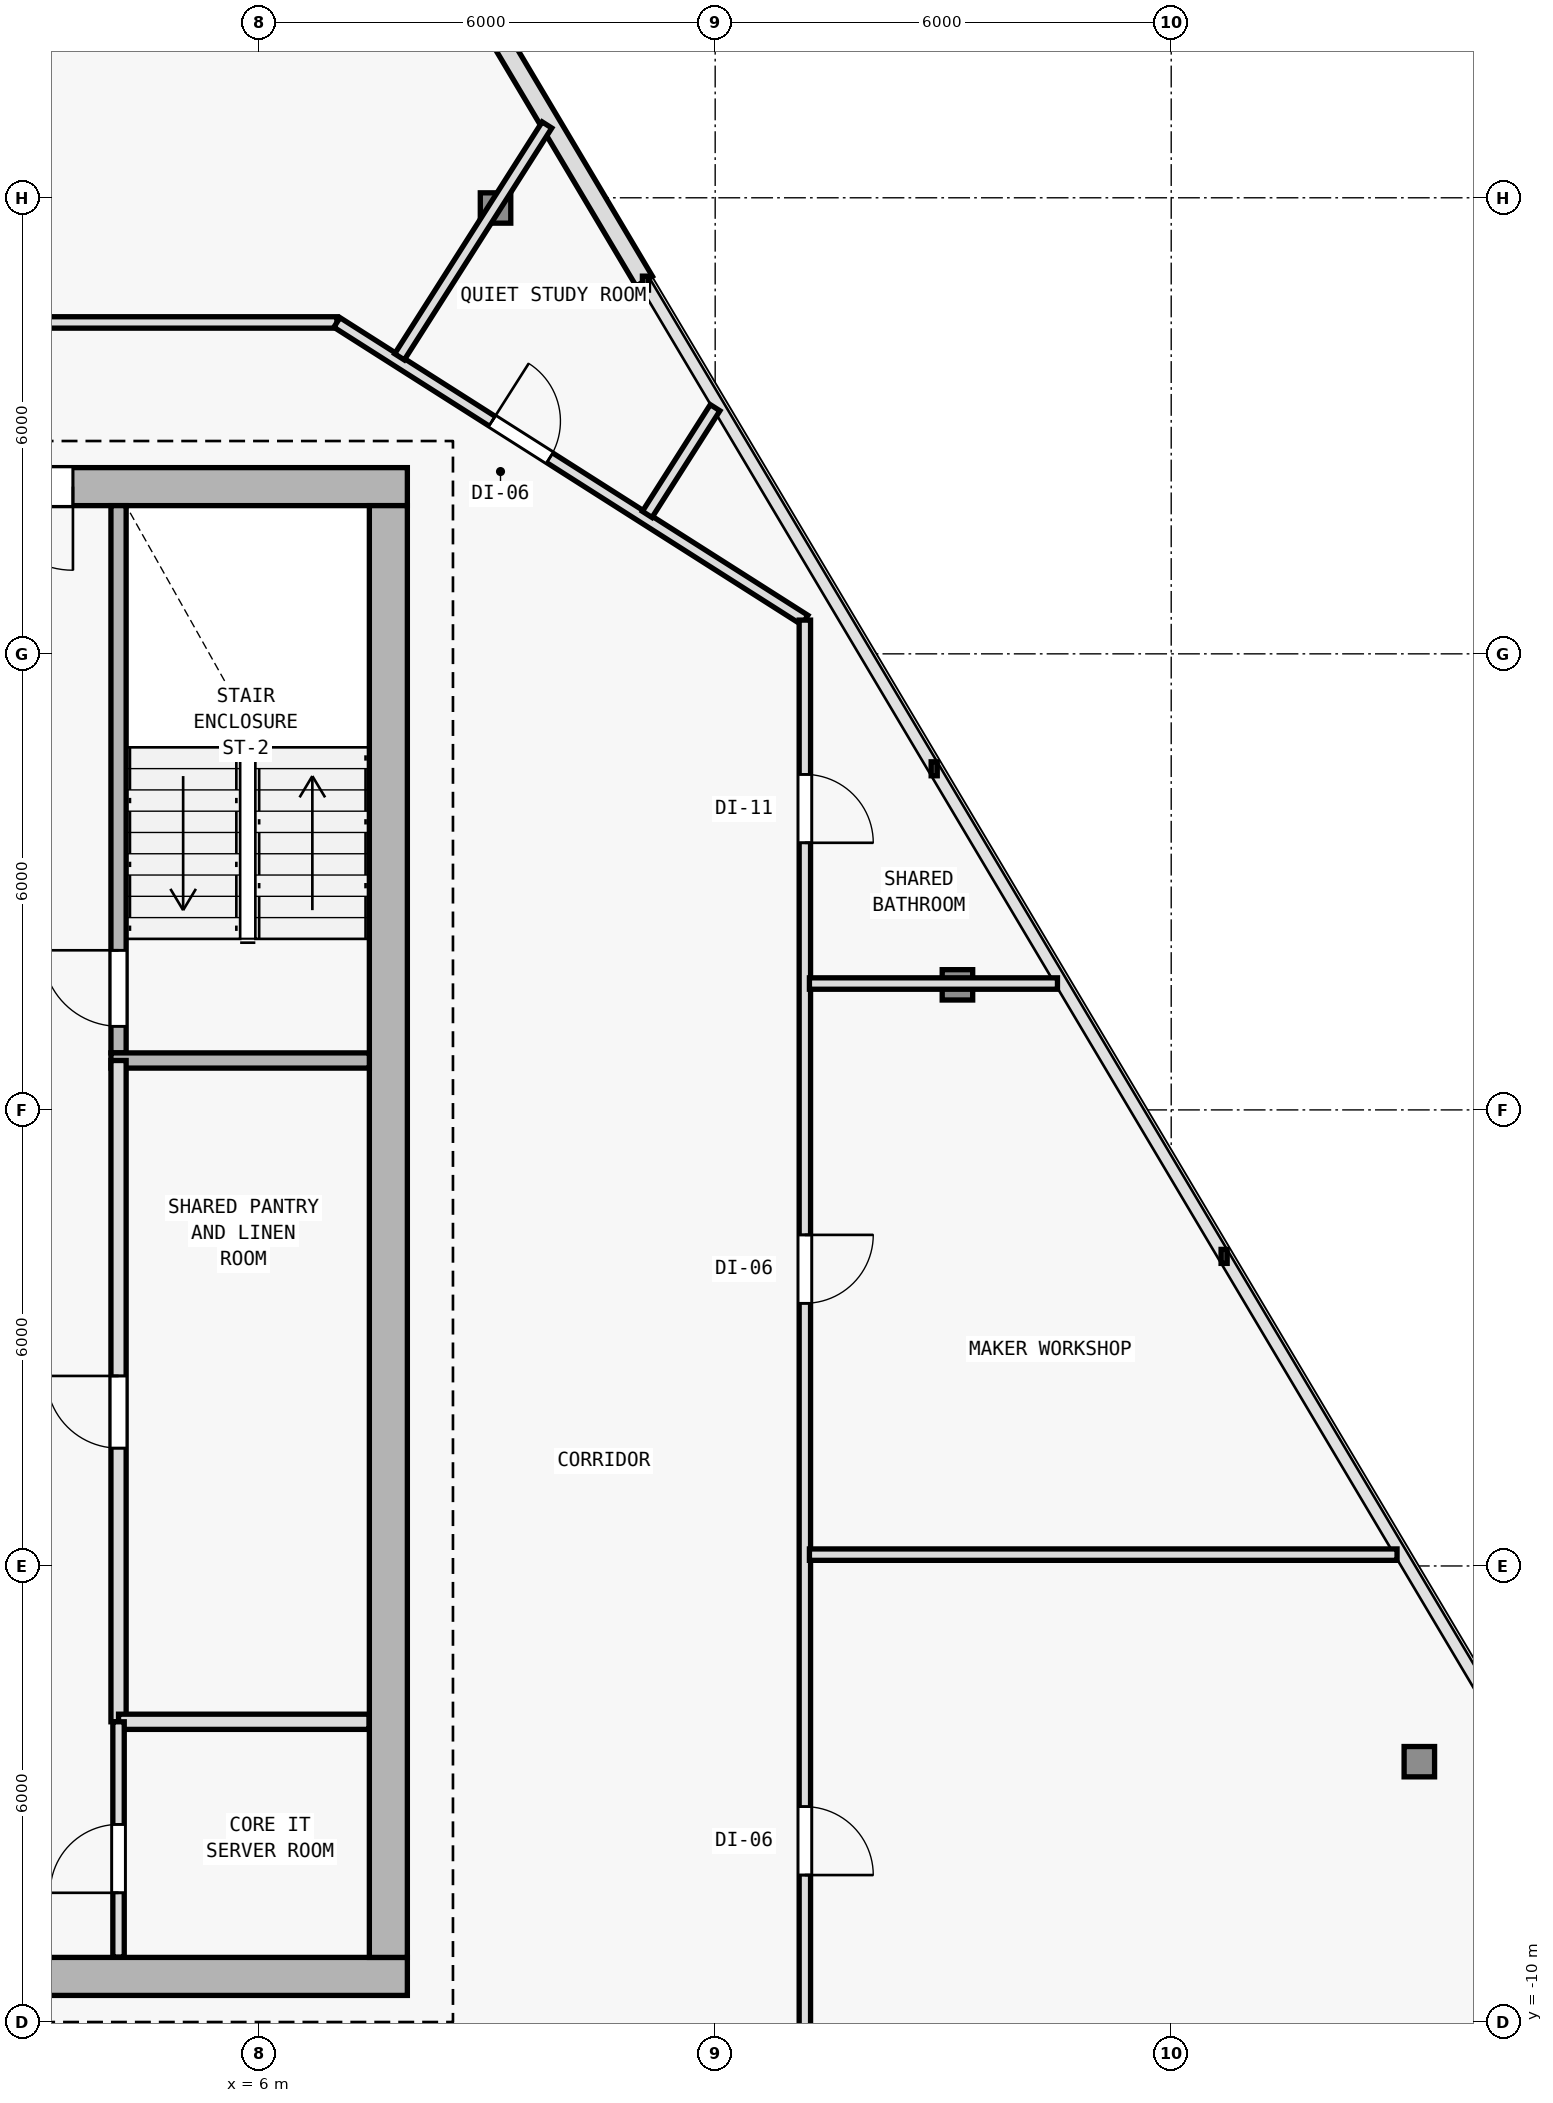
"""IFC4 building model, lengths in metres.
Left out: names, types, materials, properties, quantities, classifications, styles, units other than length and angle.
Written with IfcOpenShell. Run it as: python <this file> out.ifc"""

import sys

from ifc_helpers import new_model, si_unit, direction, frame, frame_2d, origin, origin_2d, place, context, subcontext, project, spatial, rectangle, i_section, extrude, element, fill, save


model = new_model("IFC4")
c1 = context("Model", 3, precision=1e-05, world=origin(), true_north=direction((0.0, 1.0)))
c2 = subcontext(c1, "Body", "Model", "MODEL_VIEW")
j1 = project(units=[si_unit("LENGTHUNIT", "METRE"), si_unit("PLANEANGLEUNIT", "RADIAN")], contexts=[c1])
p1 = place(None, origin())
s1 = spatial("IfcSite", under=j1, at=p1, CompositionType="ELEMENT")
p2 = place(p1, origin())
s2 = spatial("IfcBuilding", under=s1, at=p2, CompositionType="ELEMENT")
p3 = place(p2, frame((0.0, 0.0, 181.8)))
s3 = spatial("IfcBuildingStorey", under=s2, at=p3, CompositionType="ELEMENT", Elevation=181.8)
for number, where, z_axis, x_axis in (
    (1, (7.7, -9.4, 0.0), (0.0, 0.0, 1.0), (1.0, 0.0, 0.0)),
    (2, (7.7, 10.2, 0.0), (0.0, 0.0, 1.0), (1.0, 0.0, 0.0)),
    (3, (7.7, 0.4, 0.0), (0.0, 0.0, 1.0), (1.0, 0.0, 0.0)),
):
    element("IfcColumn", number, at=place(p3, frame(where, z_axis=z_axis, x_axis=x_axis)), inside=s3, PredefinedType="COLUMN", context=c2, shape_type="SweptSolid", body=[
        extrude(i_section(OverallWidth=0.404, OverallDepth=0.407, WebThickness=0.017, FlangeThickness=0.028, FilletRadius=0.015, at=origin_2d()), origin(), (0.0, 0.0, 1.0), 3.6),
    ])
p4 = place(p3, frame((21.265, -6.575, 0.005), z_axis=(-0.026105663043, 0.021618752208, 0.999425396871), x_axis=(-0.637813971185, -0.770190455771, 0.0)))
e4 = element("IfcColumn", 4, at=p4, inside=s3, PredefinedType="COLUMN", context=c2, shape_type="SweptSolid", body=[
    extrude(i_section(OverallWidth=0.401, OverallDepth=0.399, WebThickness=0.016, FlangeThickness=0.025, FilletRadius=0.015, at=origin_2d()), origin(), (0.0, 0.0, 1.0), 3.591),
])
p5 = place(p3, frame((15.188, 3.646, 0.005), z_axis=(-0.018906041, 0.009521027842, 0.999775930718), x_axis=(-0.449781931574, -0.893138406984, 0.0)))
e5 = element("IfcColumn", 5, at=p5, inside=s3, PredefinedType="COLUMN", context=c2, shape_type="SweptSolid", body=[
    extrude(i_section(OverallWidth=0.401, OverallDepth=0.399, WebThickness=0.016, FlangeThickness=0.025, FilletRadius=0.015, at=origin_2d()), origin(), (0.0, 0.0, 1.0), 3.59),
])
p6 = place(p3, frame((9.11, 13.866, 0.005), z_axis=(-0.011699046613, -0.002516655376, 0.999928396814), x_axis=(0.210305364179, -0.977635746993, 0.0)))
e6 = element("IfcColumn", 6, at=p6, inside=s3, PredefinedType="COLUMN", context=c2, shape_type="SweptSolid", body=[
    extrude(i_section(OverallWidth=0.401, OverallDepth=0.399, WebThickness=0.016, FlangeThickness=0.025, FilletRadius=0.015, at=origin_2d()), origin(), (0.0, 0.0, 1.0), 3.589),
])
p7 = place(p3, frame((5.706, 21.919, 0.0), z_axis=(0.0, 0.0, 1.0), x_axis=(0.511079110892, -0.859533677298, 0.0)))
e7 = element("IfcWall", 7, at=p7, inside=s3, PredefinedType="SOLIDWALL", context=c2, shape_type="SweptSolid", body=[
    extrude(rectangle(XDim=10.489, YDim=0.25, at=frame_2d((5.245, 0.0))), origin(), (0.0, 0.0, 1.0), 3.28),
])
p8 = place(p7, frame((4.344, 0.0, 0.62)))
e8 = element("IfcOpeningElement", 8, at=p8, cuts=e7, PredefinedType="OPENING", context=c2, shape_type="SweptSolid", body=[
    extrude(rectangle(XDim=1.8, YDim=2.1, at=frame_2d((0.9, 1.05))), frame((0.0, 0.135, 0.0), z_axis=(0.0, -1.0, 0.0), x_axis=(1.0, 0.0, 0.0)), (0.0, 0.0, 1.0), 0.27),
])
p9 = place(p3, frame((-7.95, -9.4, 0.0), z_axis=(0.0, 0.0, 1.0), x_axis=(1.0, 0.0, 0.0)))
e9 = element("IfcWall", 9, at=p9, inside=s3, PredefinedType="SHEAR", context=c2, shape_type="SweptSolid", body=[
    extrude(rectangle(XDim=15.9, YDim=0.5, at=frame_2d((7.95, 0.0))), origin(), (0.0, 0.0, 1.0), 3.28),
])
p10 = place(p9, frame((9.6, 0.0, 0.0)))
e10 = element("IfcOpeningElement", 10, at=p10, cuts=e9, PredefinedType="OPENING", context=c2, shape_type="SweptSolid", body=[
    extrude(rectangle(XDim=1.5, YDim=2.2, at=frame_2d((0.75, 1.1))), frame((0.0, 0.26, 0.0), z_axis=(0.0, -1.0, 0.0), x_axis=(1.0, 0.0, 0.0)), (0.0, 0.0, 1.0), 0.52),
])
p11 = place(p3, frame((7.95, 10.2, 0.0), z_axis=(0.0, 0.0, 1.0), x_axis=(-1.0, 0.0, 0.0)))
e11 = element("IfcWall", 11, at=p11, inside=s3, PredefinedType="SHEAR", context=c2, shape_type="SweptSolid", body=[
    extrude(rectangle(XDim=15.9, YDim=0.5, at=frame_2d((7.95, 0.0))), origin(), (0.0, 0.0, 1.0), 3.28),
])
p12 = place(p11, frame((4.4, 0.0, 0.0)))
e12 = element("IfcOpeningElement", 12, at=p12, cuts=e11, PredefinedType="OPENING", context=c2, shape_type="SweptSolid", body=[
    extrude(rectangle(XDim=1.1, YDim=2.15, at=frame_2d((0.55, 1.075))), frame((0.0, 0.26, 0.0), z_axis=(0.0, -1.0, 0.0), x_axis=(1.0, 0.0, 0.0)), (0.0, 0.0, 1.0), 0.52),
])
p13 = place(p3, frame((7.7, 9.95, 0.0), z_axis=(0.0, 0.0, 1.0), x_axis=(0.0, -1.0, 0.0)))
e13 = element("IfcWall", 13, at=p13, inside=s3, PredefinedType="SHEAR", context=c2, shape_type="SweptSolid", body=[
    extrude(rectangle(XDim=19.1, YDim=0.5, at=frame_2d((9.55, 0.0))), origin(), (0.0, 0.0, 1.0), 3.28),
])
p14 = place(p3, frame((4.15, 2.75, 0.0), z_axis=(0.0, 0.0, 1.0), x_axis=(0.0, 1.0, 0.0)))
e14 = element("IfcWall", 14, at=p14, inside=s3, PredefinedType="SOLIDWALL", context=c2, shape_type="SweptSolid", body=[
    extrude(rectangle(XDim=7.2, YDim=0.2, at=frame_2d((3.6, 0.0))), origin(), (0.0, 0.0, 1.0), 3.28),
])
p15 = place(p14, frame((0.35, 0.0, 0.0)))
e15 = element("IfcOpeningElement", 15, at=p15, cuts=e14, PredefinedType="OPENING", context=c2, shape_type="SweptSolid", body=[
    extrude(rectangle(XDim=1.0, YDim=2.15, at=frame_2d((0.5, 1.075))), frame((0.0, 0.11, 0.0), z_axis=(0.0, -1.0, 0.0), x_axis=(1.0, 0.0, 0.0)), (0.0, 0.0, 1.0), 0.22),
])
p16 = place(p3, frame((4.05, 2.65, 0.0), z_axis=(0.0, 0.0, 1.0), x_axis=(1.0, 0.0, 0.0)))
e16 = element("IfcWall", 16, at=p16, inside=s3, PredefinedType="SOLIDWALL", context=c2, shape_type="SweptSolid", body=[
    extrude(rectangle(XDim=3.4, YDim=0.2, at=frame_2d((1.7, 0.0))), origin(), (0.0, 0.0, 1.0), 3.28),
])
p17 = place(p3, frame((4.15, -6.05, 0.0), z_axis=(0.0, 0.0, 1.0), x_axis=(0.0, 1.0, 0.0)))
e17 = element("IfcWall", 17, at=p17, inside=s3, PredefinedType="SOLIDWALL", context=c2, shape_type="SweptSolid", body=[
    extrude(rectangle(XDim=8.7, YDim=0.2, at=frame_2d((4.35, 0.0))), origin(), (0.0, 0.0, 1.0), 3.28),
])
p18 = place(p17, frame((3.6, 0.0, 0.0)))
e18 = element("IfcOpeningElement", 18, at=p18, cuts=e17, PredefinedType="OPENING", context=c2, shape_type="SweptSolid", body=[
    extrude(rectangle(XDim=0.95, YDim=2.1, at=frame_2d((0.475, 1.05))), frame((0.0, 0.11, 0.0), z_axis=(0.0, -1.0, 0.0), x_axis=(1.0, 0.0, 0.0)), (0.0, 0.0, 1.0), 0.22),
])
p19 = place(p3, frame((4.15, -6.05, 0.0), z_axis=(0.0, 0.0, 1.0), x_axis=(1.0, 0.0, 0.0)))
e19 = element("IfcWall", 19, at=p19, inside=s3, PredefinedType="SOLIDWALL", context=c2, shape_type="SweptSolid", body=[
    extrude(rectangle(XDim=3.295, YDim=0.2, at=frame_2d((1.647, 0.0))), origin(), (0.0, 0.0, 1.0), 3.28),
])
p20 = place(p3, frame((4.15, -9.145, 0.0), z_axis=(0.0, 0.0, 1.0), x_axis=(0.0, 1.0, 0.0)))
e20 = element("IfcWall", 20, at=p20, inside=s3, PredefinedType="PARTITIONING", context=c2, shape_type="SweptSolid", body=[
    extrude(rectangle(XDim=3.095, YDim=0.15, at=frame_2d((1.547, 0.0))), origin(), (0.0, 0.0, 1.0), 3.28),
])
p21 = place(p20, frame((0.845, 0.0, 0.0)))
e21 = element("IfcOpeningElement", 21, at=p21, cuts=e20, PredefinedType="OPENING", context=c2, shape_type="SweptSolid", body=[
    extrude(rectangle(XDim=0.9, YDim=2.1, at=frame_2d((0.45, 1.05))), frame((0.0, 0.085, 0.0), z_axis=(0.0, -1.0, 0.0), x_axis=(1.0, 0.0, 0.0)), (0.0, 0.0, 1.0), 0.17),
])
p22 = place(p3, frame((-7.041, 12.36, 0.0), z_axis=(0.0, 0.0, 1.0), x_axis=(1.0, 0.0, 0.0)))
e22 = element("IfcWall", 22, at=p22, inside=s3, PredefinedType="PARTITIONING", context=c2, shape_type="SweptSolid", body=[
    extrude(rectangle(XDim=14.064, YDim=0.15, at=frame_2d((7.032, 0.0))), origin(), (0.0, 0.0, 1.0), 2.935),
])
p23 = place(p22, frame((9.292, 0.0, 0.0)))
e23 = element("IfcOpeningElement", 23, at=p23, cuts=e22, PredefinedType="OPENING", context=c2, shape_type="SweptSolid", body=[
    extrude(rectangle(XDim=0.9, YDim=2.1, at=frame_2d((0.45, 1.05))), frame((0.0, 0.085, 0.0), z_axis=(0.0, -1.0, 0.0), x_axis=(1.0, 0.0, 0.0)), (0.0, 0.0, 1.0), 0.17),
])
p24 = place(p22, frame((2.438, 0.0, 0.0)))
e24 = element("IfcOpeningElement", 24, at=p24, cuts=e22, PredefinedType="OPENING", context=c2, shape_type="SweptSolid", body=[
    extrude(rectangle(XDim=0.9, YDim=2.1, at=frame_2d((0.45, 1.05))), frame((0.0, 0.085, 0.0), z_axis=(0.0, -1.0, 0.0), x_axis=(1.0, 0.0, 0.0)), (0.0, 0.0, 1.0), 0.17),
])
p25 = place(p3, frame((7.023, 12.36, 0.0), z_axis=(0.0, 0.0, 1.0), x_axis=(0.84376480085, -0.536713108511, 0.0)))
e25 = element("IfcWall", 25, at=p25, inside=s3, PredefinedType="PARTITIONING", context=c2, shape_type="SweptSolid", body=[
    extrude(rectangle(XDim=7.297, YDim=0.15, at=frame_2d((3.648, 0.0))), origin(), (0.0, 0.0, 1.0), 2.705),
])
p26 = place(p25, frame((2.419, 0.0, 0.0)))
e26 = element("IfcOpeningElement", 26, at=p26, cuts=e25, PredefinedType="OPENING", context=c2, shape_type="SweptSolid", body=[
    extrude(rectangle(XDim=0.9, YDim=2.1, at=frame_2d((0.45, 1.05))), frame((0.0, 0.085, 0.0), z_axis=(0.0, -1.0, 0.0), x_axis=(1.0, 0.0, 0.0)), (0.0, 0.0, 1.0), 0.17),
])
p27 = place(p3, frame((13.18, 8.444, 0.0), z_axis=(0.0, 0.0, 1.0), x_axis=(0.0, -1.0, 0.0)))
e27 = element("IfcWall", 27, at=p27, inside=s3, PredefinedType="PARTITIONING", context=c2, shape_type="SweptSolid", body=[
    extrude(rectangle(XDim=20.004, YDim=0.15, at=frame_2d((10.002, 0.0))), origin(), (0.0, 0.0, 1.0), 2.655),
])
p28 = place(p27, frame((15.61, 0.0, 0.0)))
e28 = element("IfcOpeningElement", 28, at=p28, cuts=e27, PredefinedType="OPENING", context=c2, shape_type="SweptSolid", body=[
    extrude(rectangle(XDim=0.9, YDim=2.1, at=frame_2d((0.45, 1.05))), frame((0.0, 0.085, 0.0), z_axis=(0.0, -1.0, 0.0), x_axis=(1.0, 0.0, 0.0)), (0.0, 0.0, 1.0), 0.17),
])
p29 = place(p27, frame((8.088, 0.0, 0.0)))
e29 = element("IfcOpeningElement", 29, at=p29, cuts=e27, PredefinedType="OPENING", context=c2, shape_type="SweptSolid", body=[
    extrude(rectangle(XDim=0.9, YDim=2.1, at=frame_2d((0.45, 1.05))), frame((0.0, 0.085, 0.0), z_axis=(0.0, -1.0, 0.0), x_axis=(1.0, 0.0, 0.0)), (0.0, 0.0, 1.0), 0.17),
])
p30 = place(p27, frame((2.03, 0.0, 0.0)))
e30 = element("IfcOpeningElement", 30, at=p30, cuts=e27, PredefinedType="OPENING", context=c2, shape_type="SweptSolid", body=[
    extrude(rectangle(XDim=0.9, YDim=2.1, at=frame_2d((0.45, 1.05))), frame((0.0, 0.085, 0.0), z_axis=(0.0, -1.0, 0.0), x_axis=(1.0, 0.0, 0.0)), (0.0, 0.0, 1.0), 0.17),
])
p31 = place(p3, frame((13.24, 3.663, 0.0), z_axis=(0.0, 0.0, 1.0), x_axis=(1.0, 0.0, 0.0)))
e31 = element("IfcWall", 31, at=p31, inside=s3, PredefinedType="PARTITIONING", context=c2, shape_type="SweptSolid", body=[
    extrude(rectangle(XDim=3.264, YDim=0.15, at=frame_2d((1.632, 0.0))), origin(), (0.0, 0.0, 1.0), 2.865),
])
p32 = place(p3, frame((7.846, 11.907, 0.0), z_axis=(0.0, 0.0, 1.0), x_axis=(0.536683232566, 0.843783803994, 0.0)))
e32 = element("IfcWall", 32, at=p32, inside=s3, PredefinedType="PARTITIONING", context=c2, shape_type="SweptSolid", body=[
    extrude(rectangle(XDim=3.615, YDim=0.15, at=frame_2d((1.808, 0.0))), origin(), (0.0, 0.0, 1.0), 2.865),
])
p33 = place(p3, frame((11.106, 9.834, 0.0), z_axis=(0.0, 0.0, 1.0), x_axis=(0.536761550841, 0.843733985056, 0.0)))
e33 = element("IfcWall", 33, at=p33, inside=s3, PredefinedType="PARTITIONING", context=c2, shape_type="SweptSolid", body=[
    extrude(rectangle(XDim=1.664, YDim=0.15, at=frame_2d((0.832, 0.0))), origin(), (0.0, 0.0, 1.0), 2.865),
])
p34 = place(p3, frame((13.24, -3.851, 0.0), z_axis=(0.0, 0.0, 1.0), x_axis=(1.0, 0.0, 0.0)))
e34 = element("IfcWall", 34, at=p34, inside=s3, PredefinedType="PARTITIONING", context=c2, shape_type="SweptSolid", body=[
    extrude(rectangle(XDim=7.731, YDim=0.15, at=frame_2d((3.866, 0.0))), origin(), (0.0, 0.0, 1.0), 2.655),
])
p35 = place(p12, origin())
e35 = element("IfcDoor", 35, at=p35, inside=s3, OperationType="SINGLE_SWING_LEFT", PredefinedType="DOOR", context=c2, shape_type="SweptSolid", body=[
    extrude(rectangle(XDim=1.1, YDim=2.15, at=frame_2d((0.55, 1.075))), frame((0.0, 0.025, 0.0), z_axis=(0.0, -1.0, 0.0), x_axis=(1.0, 0.0, 0.0)), (0.0, 0.0, 1.0), 0.05),
])
fill(e12, e35)
p36 = place(p15, origin())
e36 = element("IfcDoor", 36, at=p36, inside=s3, OperationType="SINGLE_SWING_RIGHT", PredefinedType="DOOR", context=c2, shape_type="SweptSolid", body=[
    extrude(rectangle(XDim=1.0, YDim=2.15, at=frame_2d((0.5, 1.075))), frame((0.0, 0.025, 0.0), z_axis=(0.0, -1.0, 0.0), x_axis=(1.0, 0.0, 0.0)), (0.0, 0.0, 1.0), 0.05),
])
fill(e15, e36)
p37 = place(p18, origin())
e37 = element("IfcDoor", 37, at=p37, inside=s3, OperationType="SINGLE_SWING_RIGHT", PredefinedType="DOOR", context=c2, shape_type="SweptSolid", body=[
    extrude(rectangle(XDim=0.95, YDim=2.1, at=frame_2d((0.475, 1.05))), frame((0.0, 0.025, 0.0), z_axis=(0.0, -1.0, 0.0), x_axis=(1.0, 0.0, 0.0)), (0.0, 0.0, 1.0), 0.05),
])
fill(e18, e37)
p38 = place(p21, origin())
e38 = element("IfcDoor", 38, at=p38, inside=s3, OperationType="SINGLE_SWING_LEFT", PredefinedType="DOOR", context=c2, shape_type="SweptSolid", body=[
    extrude(rectangle(XDim=0.9, YDim=2.1, at=frame_2d((0.45, 1.05))), frame((0.0, 0.025, 0.0), z_axis=(0.0, -1.0, 0.0), x_axis=(1.0, 0.0, 0.0)), (0.0, 0.0, 1.0), 0.05),
])
fill(e21, e38)
p39 = place(p28, origin())
e39 = element("IfcDoor", 39, at=p39, inside=s3, OperationType="SINGLE_SWING_RIGHT", PredefinedType="DOOR", context=c2, shape_type="SweptSolid", body=[
    extrude(rectangle(XDim=0.9, YDim=2.1, at=frame_2d((0.45, 1.05))), frame((0.0, 0.025, 0.0), z_axis=(0.0, -1.0, 0.0), x_axis=(1.0, 0.0, 0.0)), (0.0, 0.0, 1.0), 0.05),
])
fill(e28, e39)
p40 = place(p29, origin())
e40 = element("IfcDoor", 40, at=p40, inside=s3, OperationType="SINGLE_SWING_LEFT", PredefinedType="DOOR", context=c2, shape_type="SweptSolid", body=[
    extrude(rectangle(XDim=0.9, YDim=2.1, at=frame_2d((0.45, 1.05))), frame((0.0, 0.025, 0.0), z_axis=(0.0, -1.0, 0.0), x_axis=(1.0, 0.0, 0.0)), (0.0, 0.0, 1.0), 0.05),
])
fill(e29, e40)
p41 = place(p30, origin())
e41 = element("IfcDoor", 41, at=p41, inside=s3, OperationType="SINGLE_SWING_RIGHT", PredefinedType="DOOR", context=c2, shape_type="SweptSolid", body=[
    extrude(rectangle(XDim=0.9, YDim=2.1, at=frame_2d((0.45, 1.05))), frame((0.0, 0.025, 0.0), z_axis=(0.0, -1.0, 0.0), x_axis=(1.0, 0.0, 0.0)), (0.0, 0.0, 1.0), 0.05),
])
fill(e30, e41)
p42 = place(p26, origin())
e42 = element("IfcDoor", 42, at=p42, inside=s3, OperationType="SINGLE_SWING_LEFT", PredefinedType="DOOR", context=c2, shape_type="SweptSolid", body=[
    extrude(rectangle(XDim=0.9, YDim=2.1, at=frame_2d((0.45, 1.05))), frame((0.0, 0.025, 0.0), z_axis=(0.0, -1.0, 0.0), x_axis=(1.0, 0.0, 0.0)), (0.0, 0.0, 1.0), 0.05),
])
fill(e26, e42)
save(model, sys.argv[1])
